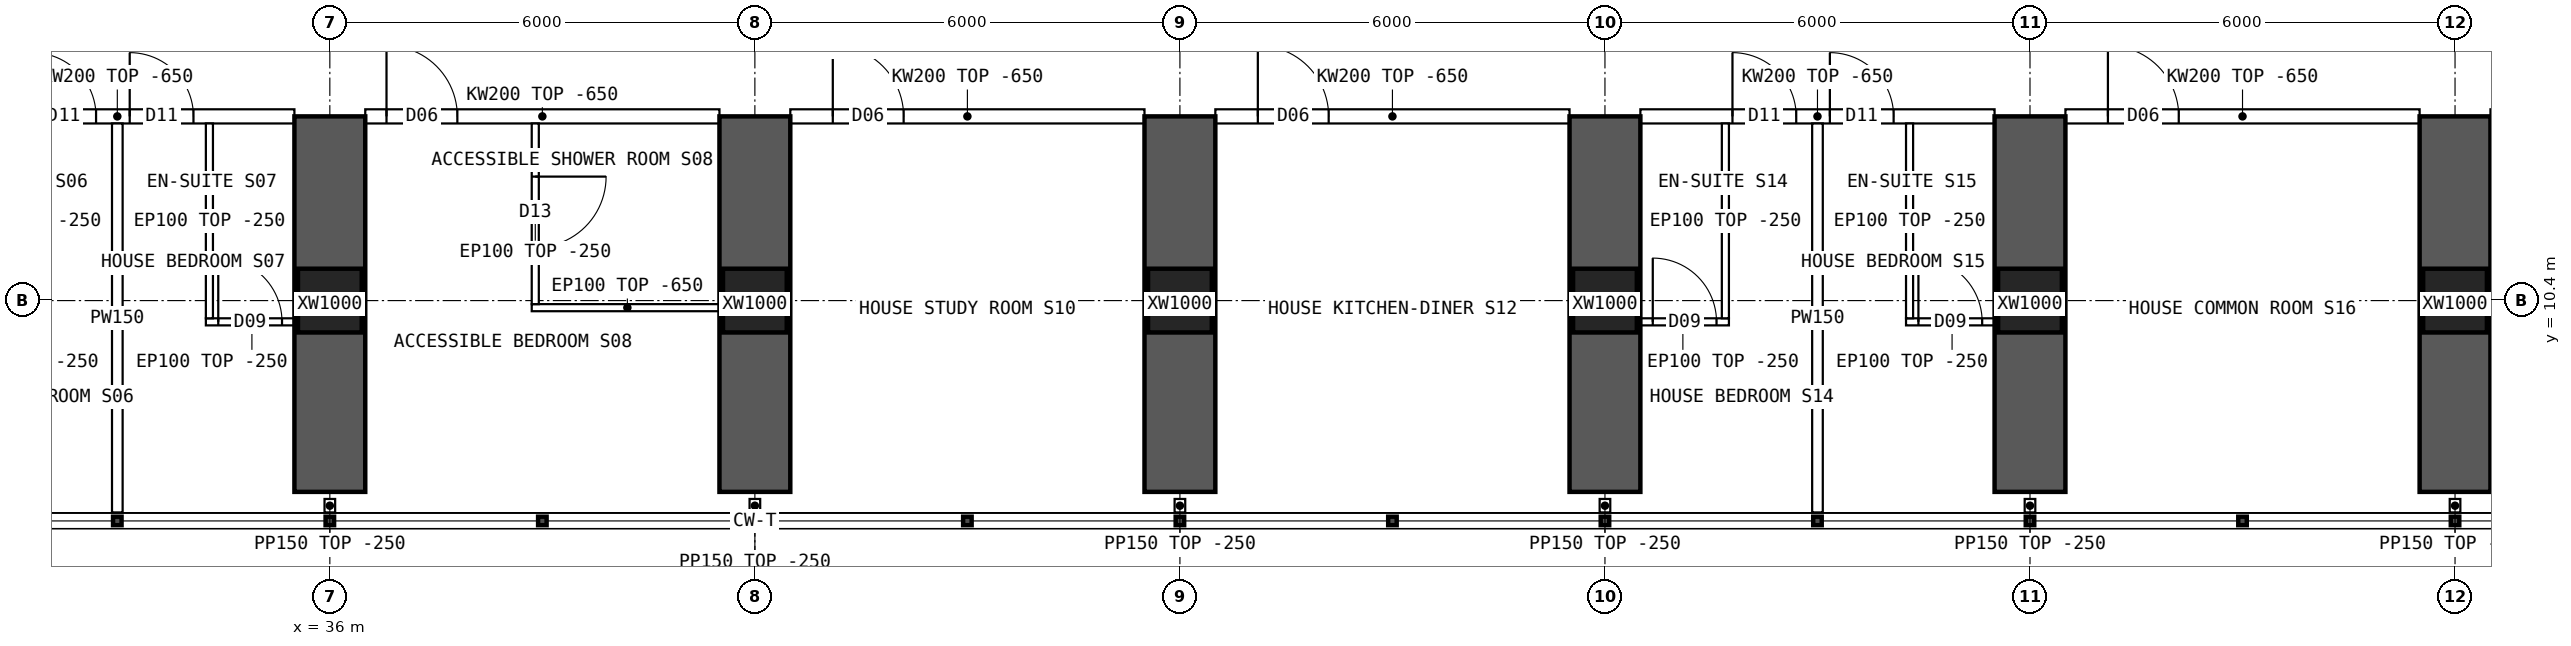
"""IFC4 building model, lengths in metres.
Left out: names, types, materials, properties, quantities, classifications, styles, units other than length and angle.
Written with IfcOpenShell. Run it as: python <this file> out.ifc"""

import sys

from ifc_helpers import new_model, si_unit, direction, frame, frame_2d, origin, origin_2d, place, context, subcontext, project, spatial, polyline, rectangle, hollow_rectangle, outline, extrude, element, fill, save


model = new_model("IFC4")
c1 = context("Model", 3, precision=1e-05, world=origin(), true_north=direction((0.0, 1.0)))
c2 = subcontext(c1, "Body", "Model", "MODEL_VIEW")
j1 = project(units=[si_unit("LENGTHUNIT", "METRE"), si_unit("PLANEANGLEUNIT", "RADIAN")], contexts=[c1])
p1 = place(None, origin())
s1 = spatial("IfcSite", under=j1, at=p1, CompositionType="ELEMENT")
p2 = place(p1, origin())
s2 = spatial("IfcBuilding", under=s1, at=p2, CompositionType="ELEMENT")
p3 = place(p2, frame((0.0, 0.0, 46.45)))
s3 = spatial("IfcBuildingStorey", under=s2, at=p3, CompositionType="ELEMENT", Elevation=46.45)
for number, where, z_axis, x_axis in (
    (1, (36.0, 10.4, 0.0), (0.0, 0.0, 1.0), (1.0, 0.0, 0.0)),
    (2, (42.0, 10.4, 0.0), (0.0, 0.0, 1.0), (1.0, 0.0, 0.0)),
    (3, (48.0, 10.4, 0.0), (0.0, 0.0, 1.0), (1.0, 0.0, 0.0)),
    (4, (54.0, 10.4, 0.0), (0.0, 0.0, 1.0), (1.0, 0.0, 0.0)),
    (5, (60.0, 10.4, 0.0), (0.0, 0.0, 1.0), (1.0, 0.0, 0.0)),
    (6, (66.0, 10.4, 0.0), (0.0, 0.0, 1.0), (1.0, 0.0, 0.0)),
):
    element("IfcColumn", number, at=place(p3, frame(where, z_axis=z_axis, x_axis=x_axis)), inside=s3, PredefinedType="COLUMN", context=c2, shape_type="SweptSolid", body=[
        extrude(hollow_rectangle(XDim=0.9, YDim=0.9, WallThickness=0.09, at=origin_2d()), origin(), (0.0, 0.0, 1.0), 3.75),
    ])
for number, where, z_axis, x_axis in (
    (7, (36.0, 7.7, 0.0), (0.0, 0.0, 1.0), (0.0, 1.0, 0.0)),
    (8, (42.0, 7.7, 0.0), (0.0, 0.0, 1.0), (0.0, 1.0, 0.0)),
    (9, (48.0, 7.7, 0.0), (0.0, 0.0, 1.0), (0.0, 1.0, 0.0)),
    (10, (54.0, 7.7, 0.0), (0.0, 0.0, 1.0), (0.0, 1.0, 0.0)),
    (11, (60.0, 7.7, 0.0), (0.0, 0.0, 1.0), (0.0, 1.0, 0.0)),
    (12, (66.0, 7.7, 0.0), (0.0, 0.0, 1.0), (0.0, 1.0, 0.0)),
):
    element("IfcWall", number, at=place(p3, frame(where, z_axis=z_axis, x_axis=x_axis)), inside=s3, PredefinedType="SHEAR", context=c2, shape_type="SweptSolid", body=[
        extrude(rectangle(XDim=5.3, YDim=1.0, at=frame_2d((2.65, 0.0))), origin(), (0.0, 0.0, 1.0), 3.75),
    ])
p4 = place(p3, frame((30.5, 13.0, 0.0), z_axis=(0.0, 0.0, 1.0), x_axis=(1.0, 0.0, 0.0)))
e13 = element("IfcWall", 13, at=p4, inside=s3, PredefinedType="SOLIDWALL", context=c2, shape_type="SweptSolid", body=[
    extrude(outline(polyline([(0.0, 0.0), (5.0, 0.0), (5.0, 3.1), (0.0, 3.1), (0.0, 0.0)])), frame((0.0, 0.1, 0.0), z_axis=(0.0, -1.0, 0.0), x_axis=(1.0, 0.0, 0.0)), (0.0, 0.0, 1.0), 0.2),
])
p5 = place(p4, frame((1.3, 0.0, 0.0)))
e14 = element("IfcOpeningElement", 14, at=p5, cuts=e13, PredefinedType="OPENING", context=c2, shape_type="SweptSolid", body=[
    extrude(rectangle(XDim=0.9, YDim=2.1, at=frame_2d((0.45, 1.05))), frame((0.0, 0.11, 0.0), z_axis=(0.0, -1.0, 0.0), x_axis=(1.0, 0.0, 0.0)), (0.0, 0.0, 1.0), 0.22),
])
p6 = place(p4, frame((2.675, 0.0, 0.0)))
e15 = element("IfcOpeningElement", 15, at=p6, cuts=e13, PredefinedType="OPENING", context=c2, shape_type="SweptSolid", body=[
    extrude(rectangle(XDim=0.9, YDim=2.1, at=frame_2d((0.45, 1.05))), frame((0.0, 0.11, 0.0), z_axis=(0.0, -1.0, 0.0), x_axis=(1.0, 0.0, 0.0)), (0.0, 0.0, 1.0), 0.22),
])
p7 = place(p3, frame((36.5, 13.0, 0.0), z_axis=(0.0, 0.0, 1.0), x_axis=(1.0, 0.0, 0.0)))
e16 = element("IfcWall", 16, at=p7, inside=s3, PredefinedType="SOLIDWALL", context=c2, shape_type="SweptSolid", body=[
    extrude(outline(polyline([(0.0, 0.0), (5.0, 0.0), (5.0, 3.1), (0.0, 3.1), (0.0, 0.0)])), frame((0.0, 0.1, 0.0), z_axis=(0.0, -1.0, 0.0), x_axis=(1.0, 0.0, 0.0)), (0.0, 0.0, 1.0), 0.2),
])
p8 = place(p7, frame((0.3, 0.0, 0.0)))
e17 = element("IfcOpeningElement", 17, at=p8, cuts=e16, PredefinedType="OPENING", context=c2, shape_type="SweptSolid", body=[
    extrude(rectangle(XDim=1.0, YDim=2.1, at=frame_2d((0.5, 1.05))), frame((0.0, 0.11, 0.0), z_axis=(0.0, -1.0, 0.0), x_axis=(1.0, 0.0, 0.0)), (0.0, 0.0, 1.0), 0.22),
])
p9 = place(p3, frame((42.5, 13.0, 0.0), z_axis=(0.0, 0.0, 1.0), x_axis=(1.0, 0.0, 0.0)))
e18 = element("IfcWall", 18, at=p9, inside=s3, PredefinedType="SOLIDWALL", context=c2, shape_type="SweptSolid", body=[
    extrude(outline(polyline([(0.0, 0.0), (5.0, 0.0), (5.0, 3.1), (0.0, 3.1), (0.0, 0.0)])), frame((0.0, 0.1, 0.0), z_axis=(0.0, -1.0, 0.0), x_axis=(1.0, 0.0, 0.0)), (0.0, 0.0, 1.0), 0.2),
])
p10 = place(p9, frame((0.6, 0.0, 0.0)))
e19 = element("IfcOpeningElement", 19, at=p10, cuts=e18, PredefinedType="OPENING", context=c2, shape_type="SweptSolid", body=[
    extrude(rectangle(XDim=1.0, YDim=2.1, at=frame_2d((0.5, 1.05))), frame((0.0, 0.11, 0.0), z_axis=(0.0, -1.0, 0.0), x_axis=(1.0, 0.0, 0.0)), (0.0, 0.0, 1.0), 0.22),
])
p11 = place(p3, frame((48.5, 13.0, 0.0), z_axis=(0.0, 0.0, 1.0), x_axis=(1.0, 0.0, 0.0)))
e20 = element("IfcWall", 20, at=p11, inside=s3, PredefinedType="SOLIDWALL", context=c2, shape_type="SweptSolid", body=[
    extrude(outline(polyline([(0.0, 0.0), (5.0, 0.0), (5.0, 3.1), (0.0, 3.1), (0.0, 0.0)])), frame((0.0, 0.1, 0.0), z_axis=(0.0, -1.0, 0.0), x_axis=(1.0, 0.0, 0.0)), (0.0, 0.0, 1.0), 0.2),
])
p12 = place(p11, frame((0.6, 0.0, 0.0)))
e21 = element("IfcOpeningElement", 21, at=p12, cuts=e20, PredefinedType="OPENING", context=c2, shape_type="SweptSolid", body=[
    extrude(rectangle(XDim=1.0, YDim=2.1, at=frame_2d((0.5, 1.05))), frame((0.0, 0.11, 0.0), z_axis=(0.0, -1.0, 0.0), x_axis=(1.0, 0.0, 0.0)), (0.0, 0.0, 1.0), 0.22),
])
p13 = place(p3, frame((54.5, 13.0, 0.0), z_axis=(0.0, 0.0, 1.0), x_axis=(1.0, 0.0, 0.0)))
e22 = element("IfcWall", 22, at=p13, inside=s3, PredefinedType="SOLIDWALL", context=c2, shape_type="SweptSolid", body=[
    extrude(outline(polyline([(0.0, 0.0), (5.0, 0.0), (5.0, 3.1), (0.0, 3.1), (0.0, 0.0)])), frame((0.0, 0.1, 0.0), z_axis=(0.0, -1.0, 0.0), x_axis=(1.0, 0.0, 0.0)), (0.0, 0.0, 1.0), 0.2),
])
p14 = place(p13, frame((1.3, 0.0, 0.0)))
e23 = element("IfcOpeningElement", 23, at=p14, cuts=e22, PredefinedType="OPENING", context=c2, shape_type="SweptSolid", body=[
    extrude(rectangle(XDim=0.9, YDim=2.1, at=frame_2d((0.45, 1.05))), frame((0.0, 0.11, 0.0), z_axis=(0.0, -1.0, 0.0), x_axis=(1.0, 0.0, 0.0)), (0.0, 0.0, 1.0), 0.22),
])
p15 = place(p13, frame((2.675, 0.0, 0.0)))
e24 = element("IfcOpeningElement", 24, at=p15, cuts=e22, PredefinedType="OPENING", context=c2, shape_type="SweptSolid", body=[
    extrude(rectangle(XDim=0.9, YDim=2.1, at=frame_2d((0.45, 1.05))), frame((0.0, 0.11, 0.0), z_axis=(0.0, -1.0, 0.0), x_axis=(1.0, 0.0, 0.0)), (0.0, 0.0, 1.0), 0.22),
])
p16 = place(p3, frame((60.5, 13.0, 0.0), z_axis=(0.0, 0.0, 1.0), x_axis=(1.0, 0.0, 0.0)))
e25 = element("IfcWall", 25, at=p16, inside=s3, PredefinedType="SOLIDWALL", context=c2, shape_type="SweptSolid", body=[
    extrude(outline(polyline([(0.0, 0.0), (5.0, 0.0), (5.0, 3.1), (0.0, 3.1), (0.0, 0.0)])), frame((0.0, 0.1, 0.0), z_axis=(0.0, -1.0, 0.0), x_axis=(1.0, 0.0, 0.0)), (0.0, 0.0, 1.0), 0.2),
])
p17 = place(p16, frame((0.6, 0.0, 0.0)))
e26 = element("IfcOpeningElement", 26, at=p17, cuts=e25, PredefinedType="OPENING", context=c2, shape_type="SweptSolid", body=[
    extrude(rectangle(XDim=1.0, YDim=2.1, at=frame_2d((0.5, 1.05))), frame((0.0, 0.11, 0.0), z_axis=(0.0, -1.0, 0.0), x_axis=(1.0, 0.0, 0.0)), (0.0, 0.0, 1.0), 0.22),
])
p18 = place(p3, frame((33.0, 7.41, 0.0), z_axis=(0.0, 0.0, 1.0), x_axis=(0.0, 1.0, 0.0)))
e27 = element("IfcWall", 27, at=p18, inside=s3, PredefinedType="PARTITIONING", context=c2, shape_type="SweptSolid", body=[
    extrude(outline(polyline([(0.0, 0.0), (5.49, 0.0), (5.49, 3.1), (5.442, 3.1), (5.44, 3.5), (3.192, 3.5), (3.19, 3.1), (2.792, 3.1), (2.79, 3.5), (0.0, 3.5), (0.0, 0.0)])), frame((0.0, 0.075, 0.0), z_axis=(0.0, -1.0, 0.0), x_axis=(1.0, 0.0, 0.0)), (0.0, 0.0, 1.0), 0.15),
])
p19 = place(p3, frame((35.55, 10.1, 0.0), z_axis=(0.0, 0.0, 1.0), x_axis=(-1.0, 0.0, 0.0)))
e28 = element("IfcWall", 28, at=p19, inside=s3, PredefinedType="PARTITIONING", context=c2, shape_type="SweptSolid", body=[
    extrude(rectangle(XDim=1.3, YDim=0.1, at=frame_2d((0.65, 0.0))), origin(), (0.0, 0.0, 1.0), 3.5),
])
p20 = place(p19, frame((0.225, 0.0, 0.0)))
e29 = element("IfcOpeningElement", 29, at=p20, cuts=e28, PredefinedType="OPENING", context=c2, shape_type="SweptSolid", body=[
    extrude(rectangle(XDim=0.9, YDim=2.1, at=frame_2d((0.45, 1.05))), frame((0.0, 0.06, 0.0), z_axis=(0.0, -1.0, 0.0), x_axis=(1.0, 0.0, 0.0)), (0.0, 0.0, 1.0), 0.12),
])
p21 = place(p3, frame((34.3, 10.15, 0.0), z_axis=(0.0, 0.0, 1.0), x_axis=(0.0, 1.0, 0.0)))
e30 = element("IfcWall", 30, at=p21, inside=s3, PredefinedType="PARTITIONING", context=c2, shape_type="SweptSolid", body=[
    extrude(outline(polyline([(0.0, 0.0), (2.75, 0.0), (2.75, 3.1), (2.702, 3.1), (2.7, 3.5), (0.452, 3.5), (0.45, 3.1), (0.052, 3.1), (0.05, 3.5), (0.0, 3.5), (0.0, 0.0)])), frame((0.0, 0.05, 0.0), z_axis=(0.0, -1.0, 0.0), x_axis=(1.0, 0.0, 0.0)), (0.0, 0.0, 1.0), 0.1),
])
p22 = place(p3, frame((38.85, 10.3, 0.0), z_axis=(0.0, 0.0, 1.0), x_axis=(1.0, 0.0, 0.0)))
e31 = element("IfcWall", 31, at=p22, inside=s3, PredefinedType="PARTITIONING", context=c2, shape_type="SweptSolid", body=[
    extrude(outline(polyline([(0.0, 0.0), (2.7, 0.0), (2.7, 3.1), (0.0, 3.1), (0.0, 0.0)])), frame((0.0, 0.05, 0.0), z_axis=(0.0, -1.0, 0.0), x_axis=(1.0, 0.0, 0.0)), (0.0, 0.0, 1.0), 0.1),
])
p23 = place(p3, frame((38.9, 10.35, 0.0), z_axis=(0.0, 0.0, 1.0), x_axis=(0.0, 1.0, 0.0)))
e32 = element("IfcWall", 32, at=p23, inside=s3, PredefinedType="PARTITIONING", context=c2, shape_type="SweptSolid", body=[
    extrude(outline(polyline([(0.0, 0.0), (2.55, 0.0), (2.55, 3.1), (2.502, 3.1), (2.5, 3.5), (0.252, 3.5), (0.25, 3.1), (0.0, 3.1), (0.0, 0.0)])), frame((0.0, 0.05, 0.0), z_axis=(0.0, -1.0, 0.0), x_axis=(1.0, 0.0, 0.0)), (0.0, 0.0, 1.0), 0.1),
])
p24 = place(p23, frame((0.8, 0.0, 0.0)))
e33 = element("IfcOpeningElement", 33, at=p24, cuts=e32, PredefinedType="OPENING", context=c2, shape_type="SweptSolid", body=[
    extrude(rectangle(XDim=1.0, YDim=2.1, at=frame_2d((0.5, 1.05))), frame((0.0, 0.06, 0.0), z_axis=(0.0, -1.0, 0.0), x_axis=(1.0, 0.0, 0.0)), (0.0, 0.0, 1.0), 0.12),
])
p25 = place(p3, frame((57.0, 7.41, 0.0), z_axis=(0.0, 0.0, 1.0), x_axis=(0.0, 1.0, 0.0)))
e34 = element("IfcWall", 34, at=p25, inside=s3, PredefinedType="PARTITIONING", context=c2, shape_type="SweptSolid", body=[
    extrude(outline(polyline([(0.0, 0.0), (5.49, 0.0), (5.49, 3.1), (5.442, 3.1), (5.44, 3.5), (3.192, 3.5), (3.19, 3.1), (2.792, 3.1), (2.79, 3.5), (0.0, 3.5), (0.0, 0.0)])), frame((0.0, 0.075, 0.0), z_axis=(0.0, -1.0, 0.0), x_axis=(1.0, 0.0, 0.0)), (0.0, 0.0, 1.0), 0.15),
])
p26 = place(p3, frame((55.75, 10.1, 0.0), z_axis=(0.0, 0.0, 1.0), x_axis=(-1.0, 0.0, 0.0)))
e35 = element("IfcWall", 35, at=p26, inside=s3, PredefinedType="PARTITIONING", context=c2, shape_type="SweptSolid", body=[
    extrude(rectangle(XDim=1.3, YDim=0.1, at=frame_2d((0.65, 0.0))), origin(), (0.0, 0.0, 1.0), 3.5),
])
p27 = place(p26, frame((0.175, 0.0, 0.0)))
e36 = element("IfcOpeningElement", 36, at=p27, cuts=e35, PredefinedType="OPENING", context=c2, shape_type="SweptSolid", body=[
    extrude(rectangle(XDim=0.9, YDim=2.1, at=frame_2d((0.45, 1.05))), frame((0.0, 0.06, 0.0), z_axis=(0.0, -1.0, 0.0), x_axis=(1.0, 0.0, 0.0)), (0.0, 0.0, 1.0), 0.12),
])
p28 = place(p3, frame((55.7, 10.15, 0.0), z_axis=(0.0, 0.0, 1.0), x_axis=(0.0, 1.0, 0.0)))
e37 = element("IfcWall", 37, at=p28, inside=s3, PredefinedType="PARTITIONING", context=c2, shape_type="SweptSolid", body=[
    extrude(outline(polyline([(0.0, 0.0), (2.75, 0.0), (2.75, 3.1), (2.702, 3.1), (2.7, 3.5), (0.452, 3.5), (0.45, 3.1), (0.052, 3.1), (0.05, 3.5), (0.0, 3.5), (0.0, 0.0)])), frame((0.0, 0.05, 0.0), z_axis=(0.0, -1.0, 0.0), x_axis=(1.0, 0.0, 0.0)), (0.0, 0.0, 1.0), 0.1),
])
p29 = place(p3, frame((59.55, 10.1, 0.0), z_axis=(0.0, 0.0, 1.0), x_axis=(-1.0, 0.0, 0.0)))
e38 = element("IfcWall", 38, at=p29, inside=s3, PredefinedType="PARTITIONING", context=c2, shape_type="SweptSolid", body=[
    extrude(rectangle(XDim=1.3, YDim=0.1, at=frame_2d((0.65, 0.0))), origin(), (0.0, 0.0, 1.0), 3.5),
])
p30 = place(p29, frame((0.225, 0.0, 0.0)))
e39 = element("IfcOpeningElement", 39, at=p30, cuts=e38, PredefinedType="OPENING", context=c2, shape_type="SweptSolid", body=[
    extrude(rectangle(XDim=0.9, YDim=2.1, at=frame_2d((0.45, 1.05))), frame((0.0, 0.06, 0.0), z_axis=(0.0, -1.0, 0.0), x_axis=(1.0, 0.0, 0.0)), (0.0, 0.0, 1.0), 0.12),
])
p31 = place(p3, frame((58.3, 10.15, 0.0), z_axis=(0.0, 0.0, 1.0), x_axis=(0.0, 1.0, 0.0)))
e40 = element("IfcWall", 40, at=p31, inside=s3, PredefinedType="PARTITIONING", context=c2, shape_type="SweptSolid", body=[
    extrude(outline(polyline([(0.0, 0.0), (2.75, 0.0), (2.75, 3.1), (2.702, 3.1), (2.7, 3.5), (0.452, 3.5), (0.45, 3.1), (0.052, 3.1), (0.05, 3.5), (0.0, 3.5), (0.0, 0.0)])), frame((0.0, 0.05, 0.0), z_axis=(0.0, -1.0, 0.0), x_axis=(1.0, 0.0, 0.0)), (0.0, 0.0, 1.0), 0.1),
])
p32 = place(p3, frame((67.75, 10.1, 0.0), z_axis=(0.0, 0.0, 1.0), x_axis=(-1.0, 0.0, 0.0)))
e41 = element("IfcWall", 41, at=p32, inside=s3, PredefinedType="PARTITIONING", context=c2, shape_type="SweptSolid", body=[
    extrude(rectangle(XDim=1.3, YDim=0.1, at=frame_2d((0.65, 0.0))), origin(), (0.0, 0.0, 1.0), 3.5),
])
p33 = place(p32, frame((0.175, 0.0, 0.0)))
e42 = element("IfcOpeningElement", 42, at=p33, cuts=e41, PredefinedType="OPENING", context=c2, shape_type="SweptSolid", body=[
    extrude(rectangle(XDim=0.9, YDim=2.1, at=frame_2d((0.45, 1.05))), frame((0.0, 0.06, 0.0), z_axis=(0.0, -1.0, 0.0), x_axis=(1.0, 0.0, 0.0)), (0.0, 0.0, 1.0), 0.12),
])
for number, where, z_axis, x_axis in (
    (43, (36.0, 7.6, 0.0), (0.0, 0.0, 1.0), (0.0, -1.0, 0.0)),
    (44, (42.0, 7.6, 0.0), (0.0, 0.0, 1.0), (0.0, -1.0, 0.0)),
    (45, (48.0, 7.6, 0.0), (0.0, 0.0, 1.0), (0.0, -1.0, 0.0)),
    (46, (54.0, 7.6, 0.0), (0.0, 0.0, 1.0), (0.0, -1.0, 0.0)),
    (47, (60.0, 7.6, 0.0), (0.0, 0.0, 1.0), (0.0, -1.0, 0.0)),
    (48, (66.0, 7.6, 0.0), (0.0, 0.0, 1.0), (0.0, -1.0, 0.0)),
):
    element("IfcWall", number, at=place(p3, frame(where, z_axis=z_axis, x_axis=x_axis)), inside=s3, PredefinedType="PARTITIONING", context=c2, shape_type="SweptSolid", body=[
        extrude(rectangle(XDim=0.19, YDim=0.15, at=frame_2d((0.095, 0.0))), origin(), (0.0, 0.0, 1.0), 3.5),
    ])
p34 = place(p5, origin())
e49 = element("IfcDoor", 49, at=p34, inside=s3, OperationType="SINGLE_SWING_LEFT", PredefinedType="DOOR", context=c2, shape_type="SweptSolid", body=[
    extrude(rectangle(XDim=0.9, YDim=2.1, at=frame_2d((0.45, 1.05))), frame((0.0, 0.025, 0.0), z_axis=(0.0, -1.0, 0.0), x_axis=(1.0, 0.0, 0.0)), (0.0, 0.0, 1.0), 0.05),
])
fill(e14, e49)
p35 = place(p20, origin())
e50 = element("IfcDoor", 50, at=p35, inside=s3, OperationType="SINGLE_SWING_RIGHT", PredefinedType="DOOR", context=c2, shape_type="SweptSolid", body=[
    extrude(rectangle(XDim=0.9, YDim=2.1, at=frame_2d((0.45, 1.05))), frame((0.0, 0.025, 0.0), z_axis=(0.0, -1.0, 0.0), x_axis=(1.0, 0.0, 0.0)), (0.0, 0.0, 1.0), 0.05),
])
fill(e29, e50)
p36 = place(p6, origin())
e51 = element("IfcDoor", 51, at=p36, inside=s3, OperationType="SINGLE_SWING_LEFT", PredefinedType="DOOR", context=c2, shape_type="SweptSolid", body=[
    extrude(rectangle(XDim=0.9, YDim=2.1, at=frame_2d((0.45, 1.05))), frame((0.0, 0.025, 0.0), z_axis=(0.0, -1.0, 0.0), x_axis=(1.0, 0.0, 0.0)), (0.0, 0.0, 1.0), 0.05),
])
fill(e15, e51)
p37 = place(p24, origin())
e52 = element("IfcDoor", 52, at=p37, inside=s3, OperationType="SINGLE_SWING_RIGHT", PredefinedType="DOOR", context=c2, shape_type="SweptSolid", body=[
    extrude(rectangle(XDim=1.0, YDim=2.1, at=frame_2d((0.5, 1.05))), frame((0.0, 0.025, 0.0), z_axis=(0.0, -1.0, 0.0), x_axis=(1.0, 0.0, 0.0)), (0.0, 0.0, 1.0), 0.05),
])
fill(e33, e52)
p38 = place(p8, origin())
e53 = element("IfcDoor", 53, at=p38, inside=s3, OperationType="SINGLE_SWING_LEFT", PredefinedType="DOOR", context=c2, shape_type="SweptSolid", body=[
    extrude(rectangle(XDim=1.0, YDim=2.1, at=frame_2d((0.5, 1.05))), frame((0.0, 0.025, 0.0), z_axis=(0.0, -1.0, 0.0), x_axis=(1.0, 0.0, 0.0)), (0.0, 0.0, 1.0), 0.05),
])
fill(e17, e53)
p39 = place(p10, origin())
e54 = element("IfcDoor", 54, at=p39, inside=s3, OperationType="SINGLE_SWING_LEFT", PredefinedType="DOOR", context=c2, shape_type="SweptSolid", body=[
    extrude(rectangle(XDim=1.0, YDim=2.1, at=frame_2d((0.5, 1.05))), frame((0.0, 0.025, 0.0), z_axis=(0.0, -1.0, 0.0), x_axis=(1.0, 0.0, 0.0)), (0.0, 0.0, 1.0), 0.05),
])
fill(e19, e54)
p40 = place(p12, origin())
e55 = element("IfcDoor", 55, at=p40, inside=s3, OperationType="SINGLE_SWING_LEFT", PredefinedType="DOOR", context=c2, shape_type="SweptSolid", body=[
    extrude(rectangle(XDim=1.0, YDim=2.1, at=frame_2d((0.5, 1.05))), frame((0.0, 0.025, 0.0), z_axis=(0.0, -1.0, 0.0), x_axis=(1.0, 0.0, 0.0)), (0.0, 0.0, 1.0), 0.05),
])
fill(e21, e55)
p41 = place(p27, origin())
e56 = element("IfcDoor", 56, at=p41, inside=s3, OperationType="SINGLE_SWING_RIGHT", PredefinedType="DOOR", context=c2, shape_type="SweptSolid", body=[
    extrude(rectangle(XDim=0.9, YDim=2.1, at=frame_2d((0.45, 1.05))), frame((0.0, 0.025, 0.0), z_axis=(0.0, -1.0, 0.0), x_axis=(1.0, 0.0, 0.0)), (0.0, 0.0, 1.0), 0.05),
])
fill(e36, e56)
p42 = place(p14, origin())
e57 = element("IfcDoor", 57, at=p42, inside=s3, OperationType="SINGLE_SWING_LEFT", PredefinedType="DOOR", context=c2, shape_type="SweptSolid", body=[
    extrude(rectangle(XDim=0.9, YDim=2.1, at=frame_2d((0.45, 1.05))), frame((0.0, 0.025, 0.0), z_axis=(0.0, -1.0, 0.0), x_axis=(1.0, 0.0, 0.0)), (0.0, 0.0, 1.0), 0.05),
])
fill(e23, e57)
p43 = place(p30, origin())
e58 = element("IfcDoor", 58, at=p43, inside=s3, OperationType="SINGLE_SWING_RIGHT", PredefinedType="DOOR", context=c2, shape_type="SweptSolid", body=[
    extrude(rectangle(XDim=0.9, YDim=2.1, at=frame_2d((0.45, 1.05))), frame((0.0, 0.025, 0.0), z_axis=(0.0, -1.0, 0.0), x_axis=(1.0, 0.0, 0.0)), (0.0, 0.0, 1.0), 0.05),
])
fill(e39, e58)
p44 = place(p15, origin())
e59 = element("IfcDoor", 59, at=p44, inside=s3, OperationType="SINGLE_SWING_LEFT", PredefinedType="DOOR", context=c2, shape_type="SweptSolid", body=[
    extrude(rectangle(XDim=0.9, YDim=2.1, at=frame_2d((0.45, 1.05))), frame((0.0, 0.025, 0.0), z_axis=(0.0, -1.0, 0.0), x_axis=(1.0, 0.0, 0.0)), (0.0, 0.0, 1.0), 0.05),
])
fill(e24, e59)
p45 = place(p17, origin())
e60 = element("IfcDoor", 60, at=p45, inside=s3, OperationType="SINGLE_SWING_LEFT", PredefinedType="DOOR", context=c2, shape_type="SweptSolid", body=[
    extrude(rectangle(XDim=1.0, YDim=2.1, at=frame_2d((0.5, 1.05))), frame((0.0, 0.025, 0.0), z_axis=(0.0, -1.0, 0.0), x_axis=(1.0, 0.0, 0.0)), (0.0, 0.0, 1.0), 0.05),
])
fill(e26, e60)
save(model, sys.argv[1])
